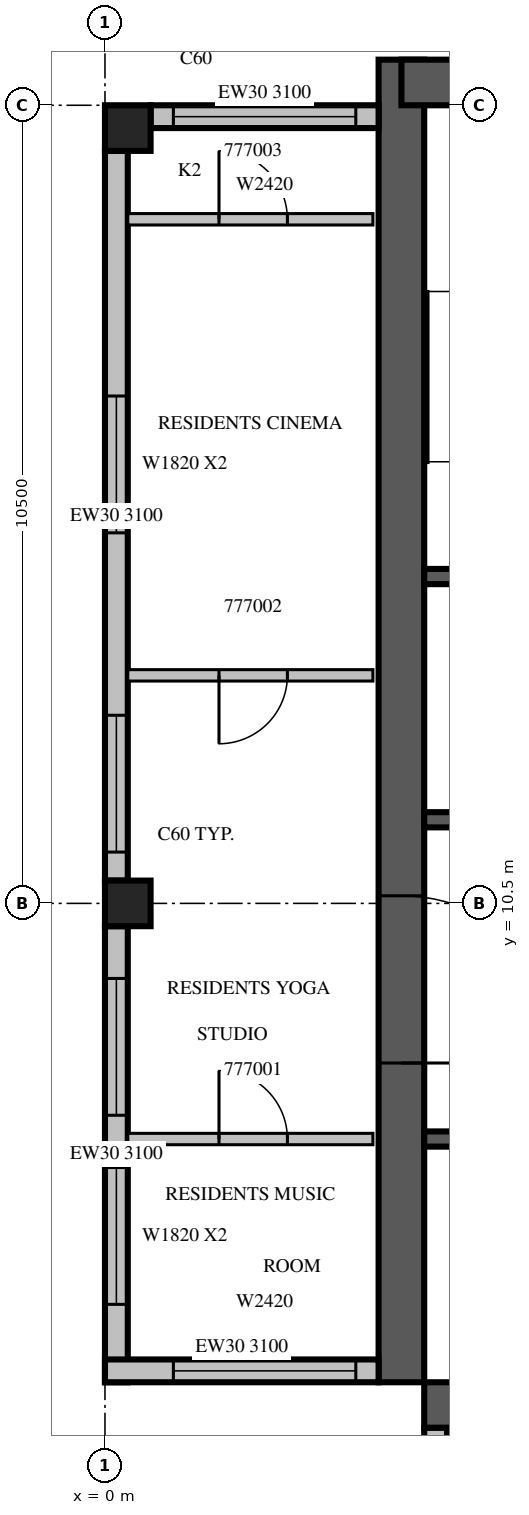
"""IFC4 building model, lengths in metres.
Left out: names, types, materials, properties, quantities, classifications, styles, units other than length and angle.
Written with IfcOpenShell. Run it as: python <this file> out.ifc"""

import sys

from ifc_helpers import new_model, si_unit, direction, frame, frame_2d, origin, origin_2d, place, context, subcontext, project, spatial, rectangle, extrude, source, transform, mapped, element, fill, save


model = new_model("IFC4")
c1 = context("Model", 3, precision=1e-05, world=origin(), true_north=direction((0.0, 1.0)))
c2 = subcontext(c1, "Body", "Model", "MODEL_VIEW")
j1 = project(units=[si_unit("LENGTHUNIT", "METRE"), si_unit("PLANEANGLEUNIT", "RADIAN")], contexts=[c1])
p1 = place(None, origin())
s1 = spatial("IfcSite", under=j1, at=p1, CompositionType="ELEMENT")
p2 = place(p1, origin())
s2 = spatial("IfcBuilding", under=s1, at=p2, CompositionType="ELEMENT")
p3 = place(p2, frame((0.0, 0.0, 330.0)))
s3 = spatial("IfcBuildingStorey", under=s2, at=p3, CompositionType="ELEMENT", Elevation=330.0)
m1 = source(origin(), c2, "Body", "SweptSolid", [
    extrude(rectangle(XDim=0.6, YDim=0.6, at=origin_2d()), origin(), (0.0, 0.0, 1.0), 3.5),
])
for number, where, z_axis, x_axis in (
    (1, (0.3, 10.5, 0.0), (0.0, 0.0, 1.0), (1.0, 0.0, 0.0)),
    (2, (0.3, 20.7, 0.0), (0.0, 0.0, 1.0), (1.0, 0.0, 0.0)),
):
    element("IfcColumn", number, at=place(p3, frame(where, z_axis=z_axis, x_axis=x_axis)), inside=s3, PredefinedType="COLUMN", context=c2, shape_type="MappedRepresentation", body=[
        mapped(m1, transform((0.0, 0.0, 0.0), scale=1.0)),
    ])
m2 = source(origin(), c2, "Body", "SweptSolid", [
    extrude(rectangle(XDim=17.4, YDim=0.6, at=frame_2d((8.7, 0.0))), origin(), (0.0, 0.0, 1.0), 3.5),
])
p4 = place(p3, frame((3.9, 4.2, 0.0), z_axis=(0.0, 0.0, 1.0), x_axis=(0.0, 1.0, 0.0)))
e3 = element("IfcWall", 3, at=p4, inside=s3, PredefinedType="SHEAR", context=c2, shape_type="MappedRepresentation", body=[
    mapped(m2, transform((0.0, 0.0, 0.0), scale=1.0)),
])
m3 = source(origin(), c2, "Body", "SweptSolid", [
    extrude(rectangle(XDim=2.2, YDim=2.1, at=frame_2d((1.1, 1.05))), frame((0.0, 0.31, 0.0), z_axis=(0.0, -1.0, 0.0), x_axis=(1.0, 0.0, 0.0)), (0.0, 0.0, 1.0), 0.62),
])
p5 = place(p4, frame((4.2, 0.0, 0.0)))
e4 = element("IfcOpeningElement", 4, at=p5, cuts=e3, PredefinedType="OPENING", context=c2, shape_type="MappedRepresentation", body=[
    mapped(m3, transform((0.0, 0.0, 0.0), scale=1.0)),
])
p6 = place(p3, frame((4.2, 3.9, 0.0), z_axis=(0.0, 0.0, 1.0), x_axis=(1.0, 0.0, 0.0)))
e5 = element("IfcWall", 5, at=p6, inside=s3, PredefinedType="SHEAR", context=c2, shape_type="MappedRepresentation", body=[
    mapped(m2, transform((0.0, 0.0, 0.0), scale=1.0)),
])
m4 = source(origin(), c2, "Body", "SweptSolid", [
    extrude(rectangle(XDim=0.9, YDim=2.1, at=frame_2d((0.45, 1.05))), frame((0.0, 0.31, 0.0), z_axis=(0.0, -1.0, 0.0), x_axis=(1.0, 0.0, 0.0)), (0.0, 0.0, 1.0), 0.62),
])
p7 = place(p6, frame((15.2, 0.0, 0.0)))
e6 = element("IfcOpeningElement", 6, at=p7, cuts=e5, PredefinedType="OPENING", context=c2, shape_type="MappedRepresentation", body=[
    mapped(m4, transform((0.0, 0.0, 0.0), scale=1.0)),
])
m5 = source(origin(), c2, "Body", "SweptSolid", [
    extrude(rectangle(XDim=6.6, YDim=0.6, at=frame_2d((3.3, 0.0))), origin(), (0.0, 0.0, 1.0), 3.5),
])
p8 = place(p3, frame((3.9, 21.3, 0.0), z_axis=(0.0, 0.0, 1.0), x_axis=(1.0, 0.0, 0.0)))
e7 = element("IfcWall", 7, at=p8, inside=s3, PredefinedType="SHEAR", context=c2, shape_type="MappedRepresentation", body=[
    mapped(m5, transform((0.0, 0.0, 0.0), scale=1.0)),
])
m6 = source(origin(), c2, "Body", "SweptSolid", [
    extrude(rectangle(XDim=1.2, YDim=2.4, at=frame_2d((0.6, 1.2))), frame((0.0, 0.31, 0.0), z_axis=(0.0, -1.0, 0.0), x_axis=(1.0, 0.0, 0.0)), (0.0, 0.0, 1.0), 0.62),
])
p9 = place(p8, frame((1.5, 0.0, 0.6)))
e8 = element("IfcOpeningElement", 8, at=p9, cuts=e7, PredefinedType="OPENING", context=c2, shape_type="MappedRepresentation", body=[
    mapped(m6, transform((0.0, 0.0, 0.0), scale=1.0)),
])
p10 = place(p8, frame((3.6, 0.0, 0.6)))
e9 = element("IfcOpeningElement", 9, at=p10, cuts=e7, PredefinedType="OPENING", context=c2, shape_type="MappedRepresentation", body=[
    mapped(m6, transform((0.0, 0.0, 0.0), scale=1.0)),
])
m7 = source(origin(), c2, "Body", "SweptSolid", [
    extrude(rectangle(XDim=3.0, YDim=0.3, at=frame_2d((1.5, 0.0))), origin(), (0.0, 0.0, 1.0), 3.1),
])
p11 = place(p3, frame((3.6, 20.85, 0.0), z_axis=(0.0, 0.0, 1.0), x_axis=(-1.0, 0.0, 0.0)))
e10 = element("IfcWall", 10, at=p11, inside=s3, PredefinedType="STANDARD", context=c2, shape_type="MappedRepresentation", body=[
    mapped(m7, transform((0.0, 0.0, 0.0), scale=1.0)),
])
m8 = source(origin(), c2, "Body", "SweptSolid", [
    extrude(rectangle(XDim=2.4, YDim=2.0, at=frame_2d((1.2, 1.0))), frame((0.0, 0.16, 0.0), z_axis=(0.0, -1.0, 0.0), x_axis=(1.0, 0.0, 0.0)), (0.0, 0.0, 1.0), 0.32),
])
p12 = place(p11, frame((0.3, 0.0, 0.6)))
e11 = element("IfcOpeningElement", 11, at=p12, cuts=e10, PredefinedType="OPENING", context=c2, shape_type="MappedRepresentation", body=[
    mapped(m8, transform((0.0, 0.0, 0.0), scale=1.0)),
])
p13 = place(p3, frame((0.15, 20.4, 0.0), z_axis=(0.0, 0.0, 1.0), x_axis=(0.0, -1.0, 0.0)))
e12 = element("IfcWall", 12, at=p13, inside=s3, PredefinedType="STANDARD", context=c2, shape_type="SweptSolid", body=[
    extrude(rectangle(XDim=9.6, YDim=0.3, at=frame_2d((4.8, 0.0))), origin(), (0.0, 0.0, 1.0), 3.1),
])
m9 = source(origin(), c2, "Body", "SweptSolid", [
    extrude(rectangle(XDim=1.8, YDim=2.0, at=frame_2d((0.9, 1.0))), frame((0.0, 0.16, 0.0), z_axis=(0.0, -1.0, 0.0), x_axis=(1.0, 0.0, 0.0)), (0.0, 0.0, 1.0), 0.32),
])
p14 = place(p13, frame((3.225, 0.0, 0.6)))
e13 = element("IfcOpeningElement", 13, at=p14, cuts=e12, PredefinedType="OPENING", context=c2, shape_type="MappedRepresentation", body=[
    mapped(m9, transform((0.0, 0.0, 0.0), scale=1.0)),
])
p15 = place(p13, frame((7.425, 0.0, 0.6)))
e14 = element("IfcOpeningElement", 14, at=p15, cuts=e12, PredefinedType="OPENING", context=c2, shape_type="MappedRepresentation", body=[
    mapped(m9, transform((0.0, 0.0, 0.0), scale=1.0)),
])
m10 = source(origin(), c2, "Body", "SweptSolid", [
    extrude(rectangle(XDim=6.0, YDim=0.3, at=frame_2d((3.0, 0.0))), origin(), (0.0, 0.0, 1.0), 3.1),
])
p16 = place(p3, frame((0.15, 10.2, 0.0), z_axis=(0.0, 0.0, 1.0), x_axis=(0.0, -1.0, 0.0)))
e15 = element("IfcWall", 15, at=p16, inside=s3, PredefinedType="STANDARD", context=c2, shape_type="MappedRepresentation", body=[
    mapped(m10, transform((0.0, 0.0, 0.0), scale=1.0)),
])
p17 = place(p16, frame((3.175, 0.0, 0.6)))
e16 = element("IfcOpeningElement", 16, at=p17, cuts=e15, PredefinedType="OPENING", context=c2, shape_type="MappedRepresentation", body=[
    mapped(m9, transform((0.0, 0.0, 0.0), scale=1.0)),
])
p18 = place(p16, frame((0.688, 0.0, 0.6)))
e17 = element("IfcOpeningElement", 17, at=p18, cuts=e15, PredefinedType="OPENING", context=c2, shape_type="MappedRepresentation", body=[
    mapped(m9, transform((0.0, 0.0, 0.0), scale=1.0)),
])
m11 = source(origin(), c2, "Body", "SweptSolid", [
    extrude(rectangle(XDim=3.6, YDim=0.3, at=frame_2d((1.8, 0.0))), origin(), (0.0, 0.0, 1.0), 3.1),
])
p19 = place(p3, frame((0.0, 4.35, 0.0), z_axis=(0.0, 0.0, 1.0), x_axis=(1.0, 0.0, 0.0)))
e18 = element("IfcWall", 18, at=p19, inside=s3, PredefinedType="STANDARD", context=c2, shape_type="MappedRepresentation", body=[
    mapped(m11, transform((0.0, 0.0, 0.0), scale=1.0)),
])
p20 = place(p19, frame((0.9, 0.0, 0.6)))
e19 = element("IfcOpeningElement", 19, at=p20, cuts=e18, PredefinedType="OPENING", context=c2, shape_type="MappedRepresentation", body=[
    mapped(m8, transform((0.0, 0.0, 0.0), scale=1.0)),
])
p21 = place(p3, frame((4.35, 3.6, 0.0), z_axis=(0.0, 0.0, 1.0), x_axis=(0.0, -1.0, 0.0)))
e20 = element("IfcWall", 20, at=p21, inside=s3, PredefinedType="STANDARD", context=c2, shape_type="MappedRepresentation", body=[
    mapped(m11, transform((0.0, 0.0, 0.0), scale=1.0)),
])
p22 = place(p21, frame((0.3, 0.0, 0.6)))
e21 = element("IfcOpeningElement", 21, at=p22, cuts=e20, PredefinedType="OPENING", context=c2, shape_type="MappedRepresentation", body=[
    mapped(m8, transform((0.0, 0.0, 0.0), scale=1.0)),
])
m12 = source(origin(), c2, "Body", "SweptSolid", [
    extrude(rectangle(XDim=9.6, YDim=0.2, at=frame_2d((4.8, 0.0))), origin(), (0.0, 0.0, 1.0), 3.5),
])
p23 = place(p3, frame((4.2, 7.4, 0.0), z_axis=(0.0, 0.0, 1.0), x_axis=(1.0, 0.0, 0.0)))
e22 = element("IfcWall", 22, at=p23, inside=s3, PredefinedType="SOLIDWALL", context=c2, shape_type="MappedRepresentation", body=[
    mapped(m12, transform((0.0, 0.0, 0.0), scale=1.0)),
])
m13 = source(origin(), c2, "Body", "SweptSolid", [
    extrude(rectangle(XDim=1.1, YDim=2.1, at=frame_2d((0.55, 1.05))), frame((0.0, 0.11, 0.0), z_axis=(0.0, -1.0, 0.0), x_axis=(1.0, 0.0, 0.0)), (0.0, 0.0, 1.0), 0.22),
])
p24 = place(p23, frame((0.65, 0.0, 0.0)))
e23 = element("IfcOpeningElement", 23, at=p24, cuts=e22, PredefinedType="OPENING", context=c2, shape_type="MappedRepresentation", body=[
    mapped(m13, transform((0.0, 0.0, 0.0), scale=1.0)),
])
p25 = place(p23, frame((3.05, 0.0, 0.0)))
e24 = element("IfcOpeningElement", 24, at=p25, cuts=e22, PredefinedType="OPENING", context=c2, shape_type="MappedRepresentation", body=[
    mapped(m13, transform((0.0, 0.0, 0.0), scale=1.0)),
])
p26 = place(p23, frame((5.45, 0.0, 0.0)))
e25 = element("IfcOpeningElement", 25, at=p26, cuts=e22, PredefinedType="OPENING", context=c2, shape_type="MappedRepresentation", body=[
    mapped(m13, transform((0.0, 0.0, 0.0), scale=1.0)),
])
p27 = place(p23, frame((7.85, 0.0, 0.0)))
e26 = element("IfcOpeningElement", 26, at=p27, cuts=e22, PredefinedType="OPENING", context=c2, shape_type="MappedRepresentation", body=[
    mapped(m13, transform((0.0, 0.0, 0.0), scale=1.0)),
])
m14 = source(origin(), c2, "Body", "SweptSolid", [
    extrude(rectangle(XDim=4.8, YDim=0.2, at=frame_2d((2.4, 0.0))), origin(), (0.0, 0.0, 1.0), 3.5),
])
p28 = place(p3, frame((4.2, 11.6, 0.0), z_axis=(0.0, 0.0, 1.0), x_axis=(1.0, 0.0, 0.0)))
e27 = element("IfcWall", 27, at=p28, inside=s3, PredefinedType="SOLIDWALL", context=c2, shape_type="MappedRepresentation", body=[
    mapped(m14, transform((0.0, 0.0, 0.0), scale=1.0)),
])
p29 = place(p28, frame((0.65, 0.0, 0.0)))
e28 = element("IfcOpeningElement", 28, at=p29, cuts=e27, PredefinedType="OPENING", context=c2, shape_type="MappedRepresentation", body=[
    mapped(m13, transform((0.0, 0.0, 0.0), scale=1.0)),
])
p30 = place(p28, frame((3.05, 0.0, 0.0)))
e29 = element("IfcOpeningElement", 29, at=p30, cuts=e27, PredefinedType="OPENING", context=c2, shape_type="MappedRepresentation", body=[
    mapped(m13, transform((0.0, 0.0, 0.0), scale=1.0)),
])
p31 = place(p3, frame((4.2, 14.8, 0.0), z_axis=(0.0, 0.0, 1.0), x_axis=(1.0, 0.0, 0.0)))
e30 = element("IfcWall", 30, at=p31, inside=s3, PredefinedType="SOLIDWALL", context=c2, shape_type="MappedRepresentation", body=[
    mapped(m14, transform((0.0, 0.0, 0.0), scale=1.0)),
])
m15 = source(origin(), c2, "Body", "SweptSolid", [
    extrude(rectangle(XDim=3.225, YDim=0.15, at=frame_2d((1.613, 0.0))), origin(), (0.0, 0.0, 1.0), 3.1),
])
p32 = place(p3, frame((0.3, 7.4, 0.0), z_axis=(0.0, 0.0, 1.0), x_axis=(1.0, 0.0, 0.0)))
e31 = element("IfcWall", 31, at=p32, inside=s3, PredefinedType="PARTITIONING", context=c2, shape_type="MappedRepresentation", body=[
    mapped(m15, transform((0.0, 0.0, 0.0), scale=1.0)),
])
m16 = source(origin(), c2, "Body", "SweptSolid", [
    extrude(rectangle(XDim=0.9, YDim=2.1, at=frame_2d((0.45, 1.05))), frame((0.0, 0.085, 0.0), z_axis=(0.0, -1.0, 0.0), x_axis=(1.0, 0.0, 0.0)), (0.0, 0.0, 1.0), 0.17),
])
p33 = place(p32, frame((1.2, 0.0, 0.0)))
e32 = element("IfcOpeningElement", 32, at=p33, cuts=e31, PredefinedType="OPENING", context=c2, shape_type="MappedRepresentation", body=[
    mapped(m16, transform((0.0, 0.0, 0.0), scale=1.0)),
])
p34 = place(p3, frame((0.3, 13.5, 0.0), z_axis=(0.0, 0.0, 1.0), x_axis=(1.0, 0.0, 0.0)))
e33 = element("IfcWall", 33, at=p34, inside=s3, PredefinedType="PARTITIONING", context=c2, shape_type="MappedRepresentation", body=[
    mapped(m15, transform((0.0, 0.0, 0.0), scale=1.0)),
])
p35 = place(p34, frame((1.2, 0.0, 0.0)))
e34 = element("IfcOpeningElement", 34, at=p35, cuts=e33, PredefinedType="OPENING", context=c2, shape_type="MappedRepresentation", body=[
    mapped(m16, transform((0.0, 0.0, 0.0), scale=1.0)),
])
p36 = place(p3, frame((0.3, 19.5, 0.0), z_axis=(0.0, 0.0, 1.0), x_axis=(1.0, 0.0, 0.0)))
e35 = element("IfcWall", 35, at=p36, inside=s3, PredefinedType="PARTITIONING", context=c2, shape_type="MappedRepresentation", body=[
    mapped(m15, transform((0.0, 0.0, 0.0), scale=1.0)),
])
p37 = place(p36, frame((1.2, 0.0, 0.0)))
e36 = element("IfcOpeningElement", 36, at=p37, cuts=e35, PredefinedType="OPENING", context=c2, shape_type="MappedRepresentation", body=[
    mapped(m16, transform((0.0, 0.0, 0.0), scale=1.0)),
])
m17 = source(origin(), c2, "Body", "SweptSolid", [
    extrude(rectangle(XDim=2.4, YDim=2.0, at=frame_2d((1.2, 1.0))), frame((0.0, 0.03, 0.0), z_axis=(0.0, -1.0, 0.0), x_axis=(1.0, 0.0, 0.0)), (0.0, 0.0, 1.0), 0.06),
])
p38 = place(p12, origin())
e37 = element("IfcWindow", 37, at=p38, inside=s3, PartitioningType="SINGLE_PANEL", PredefinedType="WINDOW", context=c2, shape_type="MappedRepresentation", body=[
    mapped(m17, transform((0.0, 0.0, 0.0), scale=1.0)),
])
fill(e11, e37)
m18 = source(origin(), c2, "Body", "SweptSolid", [
    extrude(rectangle(XDim=1.8, YDim=2.0, at=frame_2d((0.9, 1.0))), frame((0.0, 0.03, 0.0), z_axis=(0.0, -1.0, 0.0), x_axis=(1.0, 0.0, 0.0)), (0.0, 0.0, 1.0), 0.06),
])
p39 = place(p14, origin())
e38 = element("IfcWindow", 38, at=p39, inside=s3, PartitioningType="SINGLE_PANEL", PredefinedType="WINDOW", context=c2, shape_type="MappedRepresentation", body=[
    mapped(m18, transform((0.0, 0.0, 0.0), scale=1.0)),
])
fill(e13, e38)
p40 = place(p15, origin())
e39 = element("IfcWindow", 39, at=p40, inside=s3, PartitioningType="SINGLE_PANEL", PredefinedType="WINDOW", context=c2, shape_type="MappedRepresentation", body=[
    mapped(m18, transform((0.0, 0.0, 0.0), scale=1.0)),
])
fill(e14, e39)
p41 = place(p17, origin())
e40 = element("IfcWindow", 40, at=p41, inside=s3, PartitioningType="SINGLE_PANEL", PredefinedType="WINDOW", context=c2, shape_type="MappedRepresentation", body=[
    mapped(m18, transform((0.0, 0.0, 0.0), scale=1.0)),
])
fill(e16, e40)
p42 = place(p18, origin())
e41 = element("IfcWindow", 41, at=p42, inside=s3, PartitioningType="SINGLE_PANEL", PredefinedType="WINDOW", context=c2, shape_type="MappedRepresentation", body=[
    mapped(m18, transform((0.0, 0.0, 0.0), scale=1.0)),
])
fill(e17, e41)
p43 = place(p20, origin())
e42 = element("IfcWindow", 42, at=p43, inside=s3, PartitioningType="SINGLE_PANEL", PredefinedType="WINDOW", context=c2, shape_type="MappedRepresentation", body=[
    mapped(m17, transform((0.0, 0.0, 0.0), scale=1.0)),
])
fill(e19, e42)
m19 = source(origin(), c2, "Body", "SweptSolid", [
    extrude(rectangle(XDim=2.2, YDim=2.1, at=frame_2d((1.1, 1.05))), frame((0.0, 0.025, 0.0), z_axis=(0.0, -1.0, 0.0), x_axis=(1.0, 0.0, 0.0)), (0.0, 0.0, 1.0), 0.05),
])
p44 = place(p5, origin())
e43 = element("IfcDoor", 43, at=p44, inside=s3, OperationType="DOUBLE_DOOR_SINGLE_SWING", PredefinedType="DOOR", context=c2, shape_type="MappedRepresentation", body=[
    mapped(m19, transform((0.0, 0.0, 0.0), scale=1.0)),
])
fill(e4, e43)
m20 = source(origin(), c2, "Body", "SweptSolid", [
    extrude(rectangle(XDim=0.9, YDim=2.1, at=frame_2d((0.45, 1.05))), frame((0.0, 0.025, 0.0), z_axis=(0.0, -1.0, 0.0), x_axis=(1.0, 0.0, 0.0)), (0.0, 0.0, 1.0), 0.05),
])
p45 = place(p33, origin())
e44 = element("IfcDoor", 44, at=p45, inside=s3, OperationType="SINGLE_SWING_LEFT", PredefinedType="DOOR", context=c2, shape_type="MappedRepresentation", body=[
    mapped(m20, transform((0.0, 0.0, 0.0), scale=1.0)),
])
fill(e32, e44)
p46 = place(p35, origin())
e45 = element("IfcDoor", 45, at=p46, inside=s3, OperationType="SINGLE_SWING_RIGHT", PredefinedType="DOOR", context=c2, shape_type="MappedRepresentation", body=[
    mapped(m20, transform((0.0, 0.0, 0.0), scale=1.0)),
])
fill(e34, e45)
p47 = place(p37, origin())
e46 = element("IfcDoor", 46, at=p47, inside=s3, OperationType="SINGLE_SWING_LEFT", PredefinedType="DOOR", context=c2, shape_type="MappedRepresentation", body=[
    mapped(m20, transform((0.0, 0.0, 0.0), scale=1.0)),
])
fill(e36, e46)
save(model, sys.argv[1])
